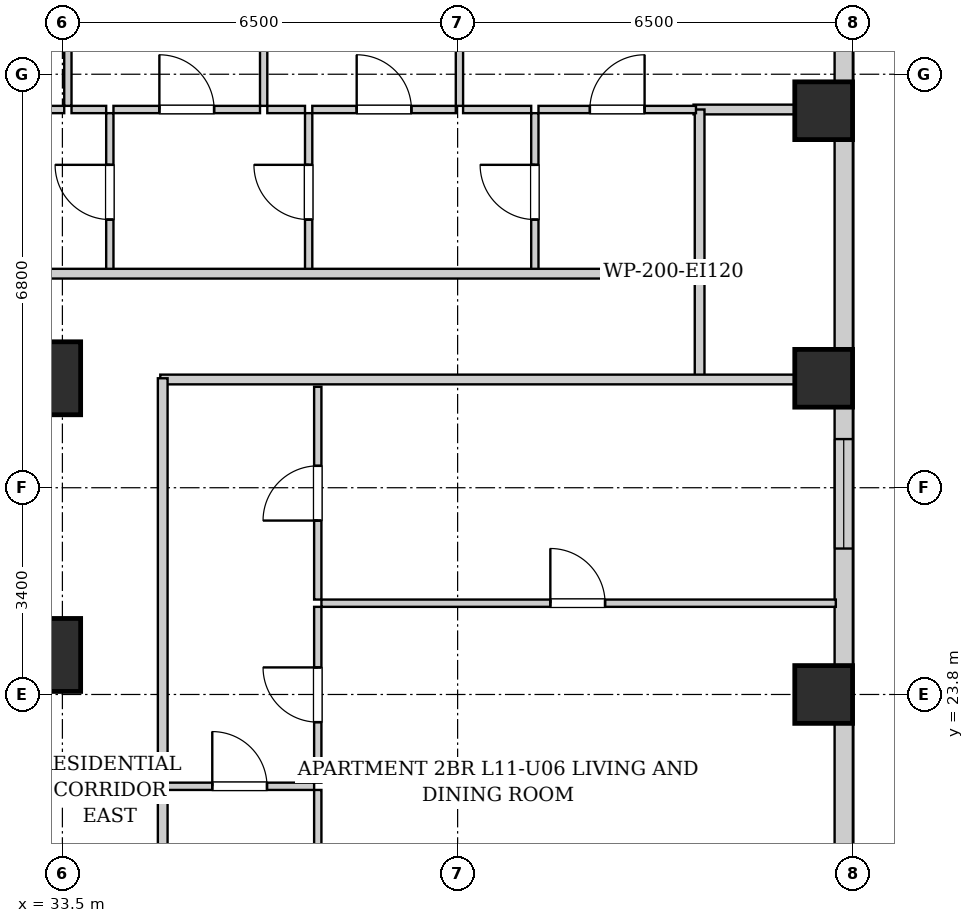
"""IFC4 building model, lengths in metres.
Left out: names, types, materials, properties, quantities, classifications, styles, units other than length and angle.
Written with IfcOpenShell. Run it as: python <this file> out.ifc"""

import sys

from ifc_helpers import new_model, si_unit, direction, frame, frame_2d, origin, origin_2d, place, context, subcontext, project, spatial, rectangle, extrude, element, fill, save


model = new_model("IFC4")
c1 = context("Model", 3, precision=1e-05, world=origin(), true_north=direction((0.0, 1.0)))
c2 = subcontext(c1, "Body", "Model", "MODEL_VIEW")
j1 = project(units=[si_unit("LENGTHUNIT", "METRE"), si_unit("PLANEANGLEUNIT", "RADIAN")], contexts=[c1])
p1 = place(None, origin())
s1 = spatial("IfcSite", under=j1, at=p1, CompositionType="ELEMENT")
p2 = place(p1, origin())
s2 = spatial("IfcBuilding", under=s1, at=p2, CompositionType="ELEMENT")
p3 = place(p2, frame((0.0, 0.0, 45.0)))
s3 = spatial("IfcBuildingStorey", under=s2, at=p3, CompositionType="ELEMENT", Elevation=45.0)
for number, where, z_axis, x_axis in (
    (1, (46.02, 23.8, 0.0), (0.0, 0.0, 1.0), (1.0, 0.0, 0.0)),
    (2, (46.02, 29.0, 0.0), (0.0, 0.0, 1.0), (1.0, 0.0, 0.0)),
    (3, (46.02, 33.4, 0.0), (0.0, 0.0, 1.0), (1.0, 0.0, 0.0)),
):
    element("IfcColumn", number, at=place(p3, frame(where, z_axis=z_axis, x_axis=x_axis)), inside=s3, PredefinedType="COLUMN", context=c2, shape_type="SweptSolid", body=[
        extrude(rectangle(XDim=0.95, YDim=0.95, at=origin_2d()), origin(), (0.0, 0.0, 1.0), 3.2),
    ])
for number, where, z_axis, x_axis in (
    (4, (33.2, 29.0, 0.0), (0.0, 0.0, 1.0), (1.0, 0.0, 0.0)),
    (5, (33.2, 24.45, 0.0), (0.0, 0.0, 1.0), (1.0, 0.0, 0.0)),
):
    element("IfcColumn", number, at=place(p3, frame(where, z_axis=z_axis, x_axis=x_axis)), inside=s3, PredefinedType="COLUMN", context=c2, shape_type="SweptSolid", body=[
        extrude(rectangle(XDim=1.2, YDim=1.2, at=origin_2d()), origin(), (0.0, 0.0, 1.0), 3.2),
    ])
p4 = place(p3, frame((46.35, 45.1, 0.0), z_axis=(0.0, 0.0, 1.0), x_axis=(0.0, -1.0, 0.0)))
e6 = element("IfcWall", 6, at=p4, inside=s3, PredefinedType="SOLIDWALL", context=c2, shape_type="SweptSolid", body=[
    extrude(rectangle(XDim=42.6, YDim=0.3, at=frame_2d((21.3, 0.0))), origin(), (0.0, 0.0, 1.0), 1.975),
])
p5 = place(p4, frame((37.575, 0.0, 0.55)))
e7 = element("IfcOpeningElement", 7, at=p5, cuts=e6, PredefinedType="OPENING", context=c2, shape_type="SweptSolid", body=[
    extrude(rectangle(XDim=1.8, YDim=1.2, at=frame_2d((0.9, 0.6))), frame((0.0, 0.16, 0.0), z_axis=(0.0, -1.0, 0.0), x_axis=(1.0, 0.0, 0.0)), (0.0, 0.0, 1.0), 0.32),
])
p6 = place(p4, frame((34.85, 0.0, 0.55)))
e8 = element("IfcOpeningElement", 8, at=p6, cuts=e6, PredefinedType="OPENING", context=c2, shape_type="SweptSolid", body=[
    extrude(rectangle(XDim=1.35, YDim=1.2, at=frame_2d((0.675, 0.6))), frame((0.0, 0.16, 0.0), z_axis=(0.0, -1.0, 0.0), x_axis=(1.0, 0.0, 0.0)), (0.0, 0.0, 1.0), 0.32),
])
p7 = place(p4, frame((3.665, 0.0, 0.55)))
e9 = element("IfcOpeningElement", 9, at=p7, cuts=e6, PredefinedType="OPENING", context=c2, shape_type="SweptSolid", body=[
    extrude(rectangle(XDim=1.8, YDim=1.2, at=frame_2d((0.9, 0.6))), frame((0.0, 0.16, 0.0), z_axis=(0.0, -1.0, 0.0), x_axis=(1.0, 0.0, 0.0)), (0.0, 0.0, 1.0), 0.32),
])
p8 = place(p4, frame((1.185, 0.0, 0.55)))
e10 = element("IfcOpeningElement", 10, at=p8, cuts=e6, PredefinedType="OPENING", context=c2, shape_type="SweptSolid", body=[
    extrude(rectangle(XDim=1.35, YDim=1.2, at=frame_2d((0.675, 0.6))), frame((0.0, 0.16, 0.0), z_axis=(0.0, -1.0, 0.0), x_axis=(1.0, 0.0, 0.0)), (0.0, 0.0, 1.0), 0.32),
])
p9 = place(p4, frame((27.225, 0.0, 0.55)))
e11 = element("IfcOpeningElement", 11, at=p9, cuts=e6, PredefinedType="OPENING", context=c2, shape_type="SweptSolid", body=[
    extrude(rectangle(XDim=1.8, YDim=1.2, at=frame_2d((0.9, 0.6))), frame((0.0, 0.16, 0.0), z_axis=(0.0, -1.0, 0.0), x_axis=(1.0, 0.0, 0.0)), (0.0, 0.0, 1.0), 0.32),
])
p10 = place(p4, frame((17.1, 0.0, 0.55)))
e12 = element("IfcOpeningElement", 12, at=p10, cuts=e6, PredefinedType="OPENING", context=c2, shape_type="SweptSolid", body=[
    extrude(rectangle(XDim=1.8, YDim=1.2, at=frame_2d((0.9, 0.6))), frame((0.0, 0.16, 0.0), z_axis=(0.0, -1.0, 0.0), x_axis=(1.0, 0.0, 0.0)), (0.0, 0.0, 1.0), 0.32),
])
p11 = place(p3, frame((43.98, 28.98, 0.0), z_axis=(0.0, 0.0, 1.0), x_axis=(0.0, 1.0, 0.0)))
e13 = element("IfcWall", 13, at=p11, inside=s3, PredefinedType="PARTITIONING", context=c2, shape_type="SweptSolid", body=[
    extrude(rectangle(XDim=1.74, YDim=0.16, at=frame_2d((0.87, 0.0))), origin(), (0.0, 0.0, 1.0), 2.94),
])
p12 = place(p3, frame((35.11, 28.98, 0.0), z_axis=(0.0, 0.0, 1.0), x_axis=(1.0, 0.0, 0.0)))
e14 = element("IfcWall", 14, at=p12, inside=s3, PredefinedType="PARTITIONING", context=c2, shape_type="SweptSolid", body=[
    extrude(rectangle(XDim=11.11, YDim=0.16, at=frame_2d((5.555, 0.0))), origin(), (0.0, 0.0, 1.0), 2.155),
])
p13 = place(p3, frame((43.88, 33.42, 0.0), z_axis=(0.0, 0.0, 1.0), x_axis=(1.0, 0.0, 0.0)))
e15 = element("IfcWall", 15, at=p13, inside=s3, PredefinedType="PARTITIONING", context=c2, shape_type="SweptSolid", body=[
    extrude(rectangle(XDim=2.34, YDim=0.16, at=frame_2d((1.17, 0.0))), origin(), (0.0, 0.0, 1.0), 2.94),
])
p14 = place(p3, frame((43.98, 30.76, 0.0), z_axis=(0.0, 0.0, 1.0), x_axis=(0.0, 1.0, 0.0)))
e16 = element("IfcWall", 16, at=p14, inside=s3, PredefinedType="PARTITIONING", context=c2, shape_type="SweptSolid", body=[
    extrude(rectangle(XDim=2.66, YDim=0.16, at=frame_2d((1.33, 0.0))), origin(), (0.0, 0.0, 1.0), 2.94),
])
p15 = place(p3, frame((34.28, 30.76, 0.0), z_axis=(0.0, 0.0, 1.0), x_axis=(0.0, 1.0, 0.0)))
e17 = element("IfcWall", 17, at=p15, inside=s3, PredefinedType="PARTITIONING", context=c2, shape_type="SweptSolid", body=[
    extrude(rectangle(XDim=2.6, YDim=0.12, at=frame_2d((1.3, 0.0))), origin(), (0.0, 0.0, 1.0), 2.94),
])
p16 = place(p15, frame((0.85, 0.0, 0.0)))
e18 = element("IfcOpeningElement", 18, at=p16, cuts=e17, PredefinedType="OPENING", context=c2, shape_type="SweptSolid", body=[
    extrude(rectangle(XDim=0.9, YDim=2.05, at=frame_2d((0.45, 1.025))), frame((0.0, 0.07, 0.0), z_axis=(0.0, -1.0, 0.0), x_axis=(1.0, 0.0, 0.0)), (0.0, 0.0, 1.0), 0.14),
])
p17 = place(p3, frame((30.62, 33.42, 0.0), z_axis=(0.0, 0.0, 1.0), x_axis=(1.0, 0.0, 0.0)))
e19 = element("IfcWall", 19, at=p17, inside=s3, PredefinedType="PARTITIONING", context=c2, shape_type="SweptSolid", body=[
    extrude(rectangle(XDim=2.91, YDim=0.12, at=frame_2d((1.455, 0.0))), origin(), (0.0, 0.0, 1.0), 2.94),
])
p18 = place(p17, frame((1.005, 0.0, 0.0)))
e20 = element("IfcOpeningElement", 20, at=p18, cuts=e19, PredefinedType="OPENING", context=c2, shape_type="SweptSolid", body=[
    extrude(rectangle(XDim=0.9, YDim=2.05, at=frame_2d((0.45, 1.025))), frame((0.0, 0.07, 0.0), z_axis=(0.0, -1.0, 0.0), x_axis=(1.0, 0.0, 0.0)), (0.0, 0.0, 1.0), 0.14),
])
p19 = place(p3, frame((33.65, 33.42, 0.0), z_axis=(0.0, 0.0, 1.0), x_axis=(1.0, 0.0, 0.0)))
e21 = element("IfcWall", 21, at=p19, inside=s3, PredefinedType="PARTITIONING", context=c2, shape_type="SweptSolid", body=[
    extrude(rectangle(XDim=0.57, YDim=0.12, at=frame_2d((0.285, 0.0))), origin(), (0.0, 0.0, 1.0), 2.94),
])
p20 = place(p3, frame((37.55, 30.76, 0.0), z_axis=(0.0, 0.0, 1.0), x_axis=(0.0, 1.0, 0.0)))
e22 = element("IfcWall", 22, at=p20, inside=s3, PredefinedType="PARTITIONING", context=c2, shape_type="SweptSolid", body=[
    extrude(rectangle(XDim=2.6, YDim=0.12, at=frame_2d((1.3, 0.0))), origin(), (0.0, 0.0, 1.0), 2.94),
])
p21 = place(p20, frame((0.85, 0.0, 0.0)))
e23 = element("IfcOpeningElement", 23, at=p21, cuts=e22, PredefinedType="OPENING", context=c2, shape_type="SweptSolid", body=[
    extrude(rectangle(XDim=0.9, YDim=2.05, at=frame_2d((0.45, 1.025))), frame((0.0, 0.07, 0.0), z_axis=(0.0, -1.0, 0.0), x_axis=(1.0, 0.0, 0.0)), (0.0, 0.0, 1.0), 0.14),
])
p22 = place(p3, frame((34.34, 33.42, 0.0), z_axis=(0.0, 0.0, 1.0), x_axis=(1.0, 0.0, 0.0)))
e24 = element("IfcWall", 24, at=p22, inside=s3, PredefinedType="PARTITIONING", context=c2, shape_type="SweptSolid", body=[
    extrude(rectangle(XDim=2.41, YDim=0.12, at=frame_2d((1.205, 0.0))), origin(), (0.0, 0.0, 1.0), 2.94),
])
p23 = place(p22, frame((0.755, 0.0, 0.0)))
e25 = element("IfcOpeningElement", 25, at=p23, cuts=e24, PredefinedType="OPENING", context=c2, shape_type="SweptSolid", body=[
    extrude(rectangle(XDim=0.9, YDim=2.05, at=frame_2d((0.45, 1.025))), frame((0.0, 0.07, 0.0), z_axis=(0.0, -1.0, 0.0), x_axis=(1.0, 0.0, 0.0)), (0.0, 0.0, 1.0), 0.14),
])
p24 = place(p3, frame((36.87, 33.42, 0.0), z_axis=(0.0, 0.0, 1.0), x_axis=(1.0, 0.0, 0.0)))
e26 = element("IfcWall", 26, at=p24, inside=s3, PredefinedType="PARTITIONING", context=c2, shape_type="SweptSolid", body=[
    extrude(rectangle(XDim=0.62, YDim=0.12, at=frame_2d((0.31, 0.0))), origin(), (0.0, 0.0, 1.0), 2.94),
])
p25 = place(p3, frame((41.27, 30.76, 0.0), z_axis=(0.0, 0.0, 1.0), x_axis=(0.0, 1.0, 0.0)))
e27 = element("IfcWall", 27, at=p25, inside=s3, PredefinedType="PARTITIONING", context=c2, shape_type="SweptSolid", body=[
    extrude(rectangle(XDim=2.6, YDim=0.12, at=frame_2d((1.3, 0.0))), origin(), (0.0, 0.0, 1.0), 2.94),
])
p26 = place(p25, frame((0.85, 0.0, 0.0)))
e28 = element("IfcOpeningElement", 28, at=p26, cuts=e27, PredefinedType="OPENING", context=c2, shape_type="SweptSolid", body=[
    extrude(rectangle(XDim=0.9, YDim=2.05, at=frame_2d((0.45, 1.025))), frame((0.0, 0.07, 0.0), z_axis=(0.0, -1.0, 0.0), x_axis=(1.0, 0.0, 0.0)), (0.0, 0.0, 1.0), 0.14),
])
p27 = place(p3, frame((37.61, 33.42, 0.0), z_axis=(0.0, 0.0, 1.0), x_axis=(1.0, 0.0, 0.0)))
e29 = element("IfcWall", 29, at=p27, inside=s3, PredefinedType="PARTITIONING", context=c2, shape_type="SweptSolid", body=[
    extrude(rectangle(XDim=2.36, YDim=0.12, at=frame_2d((1.18, 0.0))), origin(), (0.0, 0.0, 1.0), 2.94),
])
p28 = place(p27, frame((0.73, 0.0, 0.0)))
e30 = element("IfcOpeningElement", 30, at=p28, cuts=e29, PredefinedType="OPENING", context=c2, shape_type="SweptSolid", body=[
    extrude(rectangle(XDim=0.9, YDim=2.05, at=frame_2d((0.45, 1.025))), frame((0.0, 0.07, 0.0), z_axis=(0.0, -1.0, 0.0), x_axis=(1.0, 0.0, 0.0)), (0.0, 0.0, 1.0), 0.14),
])
p29 = place(p3, frame((40.09, 33.42, 0.0), z_axis=(0.0, 0.0, 1.0), x_axis=(1.0, 0.0, 0.0)))
e31 = element("IfcWall", 31, at=p29, inside=s3, PredefinedType="PARTITIONING", context=c2, shape_type="SweptSolid", body=[
    extrude(rectangle(XDim=1.12, YDim=0.12, at=frame_2d((0.56, 0.0))), origin(), (0.0, 0.0, 1.0), 2.94),
])
p30 = place(p3, frame((41.33, 33.42, 0.0), z_axis=(0.0, 0.0, 1.0), x_axis=(1.0, 0.0, 0.0)))
e32 = element("IfcWall", 32, at=p30, inside=s3, PredefinedType="PARTITIONING", context=c2, shape_type="SweptSolid", body=[
    extrude(rectangle(XDim=2.59, YDim=0.12, at=frame_2d((1.295, 0.0))), origin(), (0.0, 0.0, 1.0), 2.94),
])
p31 = place(p30, frame((0.845, 0.0, 0.0)))
e33 = element("IfcOpeningElement", 33, at=p31, cuts=e32, PredefinedType="OPENING", context=c2, shape_type="SweptSolid", body=[
    extrude(rectangle(XDim=0.9, YDim=2.05, at=frame_2d((0.45, 1.025))), frame((0.0, 0.07, 0.0), z_axis=(0.0, -1.0, 0.0), x_axis=(1.0, 0.0, 0.0)), (0.0, 0.0, 1.0), 0.14),
])
p32 = place(p3, frame((33.59, 33.48, 0.0), z_axis=(0.0, 0.0, 1.0), x_axis=(0.0, 1.0, 0.0)))
e34 = element("IfcWall", 34, at=p32, inside=s3, PredefinedType="PARTITIONING", context=c2, shape_type="SweptSolid", body=[
    extrude(rectangle(XDim=13.84, YDim=0.12, at=frame_2d((6.92, 0.0))), origin(), (0.0, 0.0, 1.0), 2.94),
])
p33 = place(p32, frame((6.455, 0.0, 0.0)))
e35 = element("IfcOpeningElement", 35, at=p33, cuts=e34, PredefinedType="OPENING", context=c2, shape_type="SweptSolid", body=[
    extrude(rectangle(XDim=0.9, YDim=2.05, at=frame_2d((0.45, 1.025))), frame((0.0, 0.07, 0.0), z_axis=(0.0, -1.0, 0.0), x_axis=(1.0, 0.0, 0.0)), (0.0, 0.0, 1.0), 0.14),
])
p34 = place(p3, frame((36.81, 33.48, 0.0), z_axis=(0.0, 0.0, 1.0), x_axis=(0.0, 1.0, 0.0)))
e36 = element("IfcWall", 36, at=p34, inside=s3, PredefinedType="PARTITIONING", context=c2, shape_type="SweptSolid", body=[
    extrude(rectangle(XDim=11.69, YDim=0.12, at=frame_2d((5.845, 0.0))), origin(), (0.0, 0.0, 1.0), 2.94),
])
p35 = place(p34, frame((5.395, 0.0, 0.0)))
e37 = element("IfcOpeningElement", 37, at=p35, cuts=e36, PredefinedType="OPENING", context=c2, shape_type="SweptSolid", body=[
    extrude(rectangle(XDim=0.9, YDim=2.05, at=frame_2d((0.45, 1.025))), frame((0.0, 0.07, 0.0), z_axis=(0.0, -1.0, 0.0), x_axis=(1.0, 0.0, 0.0)), (0.0, 0.0, 1.0), 0.14),
])
p36 = place(p3, frame((40.03, 33.48, 0.0), z_axis=(0.0, 0.0, 1.0), x_axis=(0.0, 1.0, 0.0)))
e38 = element("IfcWall", 38, at=p36, inside=s3, PredefinedType="PARTITIONING", context=c2, shape_type="SweptSolid", body=[
    extrude(rectangle(XDim=11.69, YDim=0.12, at=frame_2d((5.845, 0.0))), origin(), (0.0, 0.0, 1.0), 2.94),
])
p37 = place(p36, frame((5.395, 0.0, 0.0)))
e39 = element("IfcOpeningElement", 39, at=p37, cuts=e38, PredefinedType="OPENING", context=c2, shape_type="SweptSolid", body=[
    extrude(rectangle(XDim=0.9, YDim=2.05, at=frame_2d((0.45, 1.025))), frame((0.0, 0.07, 0.0), z_axis=(0.0, -1.0, 0.0), x_axis=(1.0, 0.0, 0.0)), (0.0, 0.0, 1.0), 0.14),
])
p38 = place(p3, frame((35.19, 22.29, 0.0), z_axis=(0.0, 0.0, 1.0), x_axis=(1.0, 0.0, 0.0)))
e40 = element("IfcWall", 40, at=p38, inside=s3, PredefinedType="PARTITIONING", context=c2, shape_type="SweptSolid", body=[
    extrude(rectangle(XDim=2.45, YDim=0.12, at=frame_2d((1.225, 0.0))), origin(), (0.0, 0.0, 1.0), 2.94),
])
p39 = place(p38, frame((0.775, 0.0, 0.0)))
e41 = element("IfcOpeningElement", 41, at=p39, cuts=e40, PredefinedType="OPENING", context=c2, shape_type="SweptSolid", body=[
    extrude(rectangle(XDim=0.9, YDim=2.05, at=frame_2d((0.45, 1.025))), frame((0.0, 0.07, 0.0), z_axis=(0.0, -1.0, 0.0), x_axis=(1.0, 0.0, 0.0)), (0.0, 0.0, 1.0), 0.14),
])
p40 = place(p3, frame((37.7, 22.35, 0.0), z_axis=(0.0, 0.0, 1.0), x_axis=(0.0, 1.0, 0.0)))
e42 = element("IfcWall", 42, at=p40, inside=s3, PredefinedType="PARTITIONING", context=c2, shape_type="SweptSolid", body=[
    extrude(rectangle(XDim=2.891, YDim=0.12, at=frame_2d((1.445, 0.0))), origin(), (0.0, 0.0, 1.0), 2.94),
])
p41 = place(p40, frame((0.995, 0.0, 0.0)))
e43 = element("IfcOpeningElement", 43, at=p41, cuts=e42, PredefinedType="OPENING", context=c2, shape_type="SweptSolid", body=[
    extrude(rectangle(XDim=0.9, YDim=2.05, at=frame_2d((0.45, 1.025))), frame((0.0, 0.07, 0.0), z_axis=(0.0, -1.0, 0.0), x_axis=(1.0, 0.0, 0.0)), (0.0, 0.0, 1.0), 0.14),
])
p42 = place(p3, frame((37.7, 25.361, 0.0), z_axis=(0.0, 0.0, 1.0), x_axis=(0.0, 1.0, 0.0)))
e44 = element("IfcWall", 44, at=p42, inside=s3, PredefinedType="PARTITIONING", context=c2, shape_type="SweptSolid", body=[
    extrude(rectangle(XDim=3.499, YDim=0.12, at=frame_2d((1.75, 0.0))), origin(), (0.0, 0.0, 1.0), 2.94),
])
p43 = place(p42, frame((1.299, 0.0, 0.0)))
e45 = element("IfcOpeningElement", 45, at=p43, cuts=e44, PredefinedType="OPENING", context=c2, shape_type="SweptSolid", body=[
    extrude(rectangle(XDim=0.9, YDim=2.05, at=frame_2d((0.45, 1.025))), frame((0.0, 0.07, 0.0), z_axis=(0.0, -1.0, 0.0), x_axis=(1.0, 0.0, 0.0)), (0.0, 0.0, 1.0), 0.14),
])
p44 = place(p3, frame((37.7, 18.829, 0.0), z_axis=(0.0, 0.0, 1.0), x_axis=(0.0, 1.0, 0.0)))
e46 = element("IfcWall", 46, at=p44, inside=s3, PredefinedType="PARTITIONING", context=c2, shape_type="SweptSolid", body=[
    extrude(rectangle(XDim=3.401, YDim=0.12, at=frame_2d((1.7, 0.0))), origin(), (0.0, 0.0, 1.0), 2.94),
])
p45 = place(p44, frame((1.25, 0.0, 0.0)))
e47 = element("IfcOpeningElement", 47, at=p45, cuts=e46, PredefinedType="OPENING", context=c2, shape_type="SweptSolid", body=[
    extrude(rectangle(XDim=0.9, YDim=2.05, at=frame_2d((0.45, 1.025))), frame((0.0, 0.07, 0.0), z_axis=(0.0, -1.0, 0.0), x_axis=(1.0, 0.0, 0.0)), (0.0, 0.0, 1.0), 0.14),
])
p46 = place(p3, frame((37.76, 25.301, 0.0), z_axis=(0.0, 0.0, 1.0), x_axis=(1.0, 0.0, 0.0)))
e48 = element("IfcWall", 48, at=p46, inside=s3, PredefinedType="PARTITIONING", context=c2, shape_type="SweptSolid", body=[
    extrude(rectangle(XDim=8.46, YDim=0.12, at=frame_2d((4.23, 0.0))), origin(), (0.0, 0.0, 1.0), 2.94),
])
p47 = place(p46, frame((3.765, 0.0, 0.0)))
e49 = element("IfcOpeningElement", 49, at=p47, cuts=e48, PredefinedType="OPENING", context=c2, shape_type="SweptSolid", body=[
    extrude(rectangle(XDim=0.9, YDim=2.05, at=frame_2d((0.45, 1.025))), frame((0.0, 0.07, 0.0), z_axis=(0.0, -1.0, 0.0), x_axis=(1.0, 0.0, 0.0)), (0.0, 0.0, 1.0), 0.14),
])
p48 = place(p3, frame((10.05, 30.72, 0.0), z_axis=(0.0, 0.0, 1.0), x_axis=(1.0, 0.0, 0.0)))
e50 = element("IfcWall", 50, at=p48, inside=s3, PredefinedType="PARTITIONING", context=c2, shape_type="SweptSolid", body=[
    extrude(rectangle(XDim=33.9, YDim=0.16, at=frame_2d((16.95, 0.0))), origin(), (0.0, 0.0, 1.0), 2.94),
])
p49 = place(p48, frame((4.035, 0.0, 0.0)))
e51 = element("IfcOpeningElement", 51, at=p49, cuts=e50, PredefinedType="OPENING", context=c2, shape_type="SweptSolid", body=[
    extrude(rectangle(XDim=0.95, YDim=2.1, at=frame_2d((0.475, 1.05))), frame((0.0, 0.09, 0.0), z_axis=(0.0, -1.0, 0.0), x_axis=(1.0, 0.0, 0.0)), (0.0, 0.0, 1.0), 0.18),
])
p50 = place(p3, frame((35.15, 15.07, 0.0), z_axis=(0.0, 0.0, 1.0), x_axis=(0.0, 1.0, 0.0)))
e52 = element("IfcWall", 52, at=p50, inside=s3, PredefinedType="PARTITIONING", context=c2, shape_type="SweptSolid", body=[
    extrude(rectangle(XDim=13.93, YDim=0.16, at=frame_2d((6.965, 0.0))), origin(), (0.0, 0.0, 1.0), 2.94),
])
p51 = place(p50, frame((4.385, 0.0, 0.0)))
e53 = element("IfcOpeningElement", 53, at=p51, cuts=e52, PredefinedType="OPENING", context=c2, shape_type="SweptSolid", body=[
    extrude(rectangle(XDim=0.95, YDim=2.1, at=frame_2d((0.475, 1.05))), frame((0.0, 0.09, 0.0), z_axis=(0.0, -1.0, 0.0), x_axis=(1.0, 0.0, 0.0)), (0.0, 0.0, 1.0), 0.18),
])
p52 = place(p16, origin())
e54 = element("IfcDoor", 54, at=p52, inside=s3, OperationType="SINGLE_SWING_RIGHT", PredefinedType="DOOR", context=c2, shape_type="SweptSolid", body=[
    extrude(rectangle(XDim=0.9, YDim=2.05, at=frame_2d((0.45, 1.025))), frame((0.0, 0.025, 0.0), z_axis=(0.0, -1.0, 0.0), x_axis=(1.0, 0.0, 0.0)), (0.0, 0.0, 1.0), 0.05),
])
fill(e18, e54)
p53 = place(p21, origin())
e55 = element("IfcDoor", 55, at=p53, inside=s3, OperationType="SINGLE_SWING_RIGHT", PredefinedType="DOOR", context=c2, shape_type="SweptSolid", body=[
    extrude(rectangle(XDim=0.9, YDim=2.05, at=frame_2d((0.45, 1.025))), frame((0.0, 0.025, 0.0), z_axis=(0.0, -1.0, 0.0), x_axis=(1.0, 0.0, 0.0)), (0.0, 0.0, 1.0), 0.05),
])
fill(e23, e55)
p54 = place(p23, origin())
e56 = element("IfcDoor", 56, at=p54, inside=s3, OperationType="SINGLE_SWING_LEFT", PredefinedType="DOOR", context=c2, shape_type="SweptSolid", body=[
    extrude(rectangle(XDim=0.9, YDim=2.05, at=frame_2d((0.45, 1.025))), frame((0.0, 0.025, 0.0), z_axis=(0.0, -1.0, 0.0), x_axis=(1.0, 0.0, 0.0)), (0.0, 0.0, 1.0), 0.05),
])
fill(e25, e56)
p55 = place(p26, origin())
e57 = element("IfcDoor", 57, at=p55, inside=s3, OperationType="SINGLE_SWING_RIGHT", PredefinedType="DOOR", context=c2, shape_type="SweptSolid", body=[
    extrude(rectangle(XDim=0.9, YDim=2.05, at=frame_2d((0.45, 1.025))), frame((0.0, 0.025, 0.0), z_axis=(0.0, -1.0, 0.0), x_axis=(1.0, 0.0, 0.0)), (0.0, 0.0, 1.0), 0.05),
])
fill(e28, e57)
p56 = place(p28, origin())
e58 = element("IfcDoor", 58, at=p56, inside=s3, OperationType="SINGLE_SWING_LEFT", PredefinedType="DOOR", context=c2, shape_type="SweptSolid", body=[
    extrude(rectangle(XDim=0.9, YDim=2.05, at=frame_2d((0.45, 1.025))), frame((0.0, 0.025, 0.0), z_axis=(0.0, -1.0, 0.0), x_axis=(1.0, 0.0, 0.0)), (0.0, 0.0, 1.0), 0.05),
])
fill(e30, e58)
p57 = place(p31, origin())
e59 = element("IfcDoor", 59, at=p57, inside=s3, OperationType="SINGLE_SWING_RIGHT", PredefinedType="DOOR", context=c2, shape_type="SweptSolid", body=[
    extrude(rectangle(XDim=0.9, YDim=2.05, at=frame_2d((0.45, 1.025))), frame((0.0, 0.025, 0.0), z_axis=(0.0, -1.0, 0.0), x_axis=(1.0, 0.0, 0.0)), (0.0, 0.0, 1.0), 0.05),
])
fill(e33, e59)
p58 = place(p39, origin())
e60 = element("IfcDoor", 60, at=p58, inside=s3, OperationType="SINGLE_SWING_LEFT", PredefinedType="DOOR", context=c2, shape_type="SweptSolid", body=[
    extrude(rectangle(XDim=0.9, YDim=2.05, at=frame_2d((0.45, 1.025))), frame((0.0, 0.025, 0.0), z_axis=(0.0, -1.0, 0.0), x_axis=(1.0, 0.0, 0.0)), (0.0, 0.0, 1.0), 0.05),
])
fill(e41, e60)
p59 = place(p41, origin())
e61 = element("IfcDoor", 61, at=p59, inside=s3, OperationType="SINGLE_SWING_RIGHT", PredefinedType="DOOR", context=c2, shape_type="SweptSolid", body=[
    extrude(rectangle(XDim=0.9, YDim=2.05, at=frame_2d((0.45, 1.025))), frame((0.0, 0.025, 0.0), z_axis=(0.0, -1.0, 0.0), x_axis=(1.0, 0.0, 0.0)), (0.0, 0.0, 1.0), 0.05),
])
fill(e43, e61)
p60 = place(p43, origin())
e62 = element("IfcDoor", 62, at=p60, inside=s3, OperationType="SINGLE_SWING_LEFT", PredefinedType="DOOR", context=c2, shape_type="SweptSolid", body=[
    extrude(rectangle(XDim=0.9, YDim=2.05, at=frame_2d((0.45, 1.025))), frame((0.0, 0.025, 0.0), z_axis=(0.0, -1.0, 0.0), x_axis=(1.0, 0.0, 0.0)), (0.0, 0.0, 1.0), 0.05),
])
fill(e45, e62)
p61 = place(p47, origin())
e63 = element("IfcDoor", 63, at=p61, inside=s3, OperationType="SINGLE_SWING_LEFT", PredefinedType="DOOR", context=c2, shape_type="SweptSolid", body=[
    extrude(rectangle(XDim=0.9, YDim=2.05, at=frame_2d((0.45, 1.025))), frame((0.0, 0.025, 0.0), z_axis=(0.0, -1.0, 0.0), x_axis=(1.0, 0.0, 0.0)), (0.0, 0.0, 1.0), 0.05),
])
fill(e49, e63)
p62 = place(p10, origin())
e64 = element("IfcWindow", 64, at=p62, inside=s3, PartitioningType="DOUBLE_PANEL_VERTICAL", PredefinedType="WINDOW", context=c2, shape_type="SweptSolid", body=[
    extrude(rectangle(XDim=1.8, YDim=1.2, at=frame_2d((0.9, 0.6))), frame((0.0, 0.03, 0.0), z_axis=(0.0, -1.0, 0.0), x_axis=(1.0, 0.0, 0.0)), (0.0, 0.0, 1.0), 0.06),
])
fill(e12, e64)
save(model, sys.argv[1])
